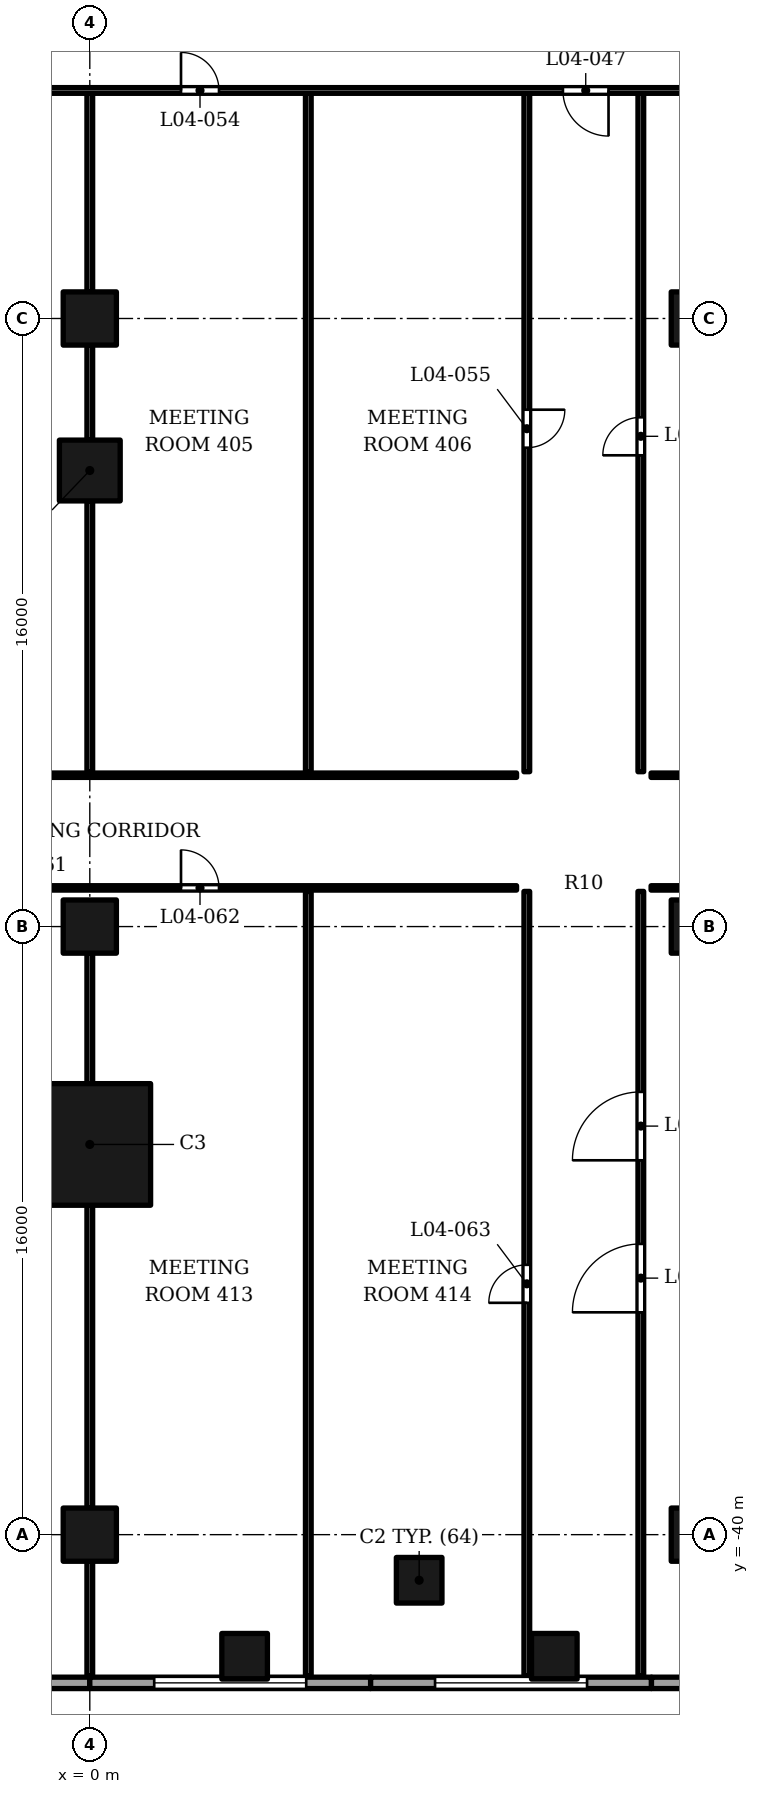
"""IFC4 building model, lengths in metres.
Left out: names, types, materials, properties, quantities, classifications, styles, units other than length and angle.
Written with IfcOpenShell. Run it as: python <this file> out.ifc"""

import sys

from ifc_helpers import new_model, si_unit, direction, frame, frame_2d, origin, origin_2d, place, context, subcontext, project, spatial, rectangle, extrude, element, fill, save


model = new_model("IFC4")
c1 = context("Model", 3, precision=1e-05, world=origin(), true_north=direction((0.0, 1.0)))
c2 = subcontext(c1, "Body", "Model", "MODEL_VIEW")
j1 = project(units=[si_unit("LENGTHUNIT", "METRE"), si_unit("PLANEANGLEUNIT", "RADIAN")], contexts=[c1])
p1 = place(None, origin())
s1 = spatial("IfcSite", under=j1, at=p1, CompositionType="ELEMENT")
p2 = place(p1, origin())
s2 = spatial("IfcBuilding", under=s1, at=p2, CompositionType="ELEMENT")
p3 = place(p2, frame((0.0, 0.0, 34.5)))
s3 = spatial("IfcBuildingStorey", under=s2, at=p3, CompositionType="ELEMENT", Elevation=34.5)
for number, where, z_axis, x_axis in (
    (1, (0.0, -40.0, 0.0), (0.0, 0.0, 1.0), (1.0, 0.0, 0.0)),
    (2, (0.0, -24.0, 0.0), (0.0, 0.0, 1.0), (1.0, 0.0, 0.0)),
    (3, (0.0, -8.0, 0.0), (0.0, 0.0, 1.0), (1.0, 0.0, 0.0)),
    (4, (16.0, -40.0, 0.0), (0.0, 0.0, 1.0), (1.0, 0.0, 0.0)),
    (5, (16.0, -24.0, 0.0), (0.0, 0.0, 1.0), (1.0, 0.0, 0.0)),
    (6, (16.0, -8.0, 0.0), (0.0, 0.0, 1.0), (1.0, 0.0, 0.0)),
):
    element("IfcColumn", number, at=place(p3, frame(where, z_axis=z_axis, x_axis=x_axis)), inside=s3, PredefinedType="COLUMN", context=c2, shape_type="SweptSolid", body=[
        extrude(rectangle(XDim=1.4, YDim=1.4, at=origin_2d()), origin(), (0.0, 0.0, 1.0), 5.5),
    ])
for number, where, z_axis, x_axis in (
    (7, (8.667, -41.2, 0.0), (0.0, 0.0, 1.0), (1.0, 0.0, 0.0)),
    (8, (12.223, -43.2, 0.0), (0.0, 0.0, 1.0), (1.0, 0.0, 0.0)),
    (9, (4.074, -43.2, 0.0), (0.0, 0.0, 1.0), (1.0, 0.0, 0.0)),
):
    element("IfcColumn", number, at=place(p3, frame(where, z_axis=z_axis, x_axis=x_axis)), inside=s3, PredefinedType="COLUMN", context=c2, shape_type="SweptSolid", body=[
        extrude(rectangle(XDim=1.2, YDim=1.2, at=origin_2d()), origin(), (0.0, 0.0, 1.0), 5.5),
    ])
p4 = place(p3, frame((0.0, -29.733, 0.0), z_axis=(0.0, 0.0, 1.0), x_axis=(0.0, 1.0, 0.0)))
e10 = element("IfcColumn", 10, at=p4, inside=s3, PredefinedType="COLUMN", context=c2, shape_type="SweptSolid", body=[
    extrude(rectangle(XDim=3.2, YDim=3.2, at=origin_2d()), origin(), (0.0, 0.0, 1.0), 5.5),
])
p5 = place(p3, frame((0.0, -12.0, 0.0), z_axis=(0.0, 0.0, 1.0), x_axis=(1.0, 0.0, 0.0)))
e11 = element("IfcColumn", 11, at=p5, inside=s3, PredefinedType="COLUMN", context=c2, shape_type="SweptSolid", body=[
    extrude(rectangle(XDim=1.6, YDim=1.6, at=origin_2d()), origin(), (0.0, 0.0, 1.0), 5.5),
])
p6 = place(p3, frame((-7.39, -43.9, 0.0), z_axis=(0.0, 0.0, 1.0), x_axis=(1.0, 0.0, 0.0)))
e12 = element("IfcWall", 12, at=p6, inside=s3, PredefinedType="SOLIDWALL", context=c2, shape_type="SweptSolid", body=[
    extrude(rectangle(XDim=7.39, YDim=0.3, at=frame_2d((3.695, 0.0))), origin(), (0.0, 0.0, 1.0), 4.1),
])
p7 = place(p6, frame((1.695, 0.0, 1.0)))
e13 = element("IfcOpeningElement", 13, at=p7, cuts=e12, PredefinedType="OPENING", context=c2, shape_type="SweptSolid", body=[
    extrude(rectangle(XDim=4.0, YDim=1.8, at=frame_2d((2.0, 0.9))), frame((0.0, 0.16, 0.0), z_axis=(0.0, -1.0, 0.0), x_axis=(1.0, 0.0, 0.0)), (0.0, 0.0, 1.0), 0.32),
])
p8 = place(p3, frame((0.0, -43.9, 0.0), z_axis=(0.0, 0.0, 1.0), x_axis=(1.0, 0.0, 0.0)))
e14 = element("IfcWall", 14, at=p8, inside=s3, PredefinedType="SOLIDWALL", context=c2, shape_type="SweptSolid", body=[
    extrude(rectangle(XDim=7.39, YDim=0.3, at=frame_2d((3.695, 0.0))), origin(), (0.0, 0.0, 1.0), 4.1),
])
p9 = place(p8, frame((1.695, 0.0, 1.0)))
e15 = element("IfcOpeningElement", 15, at=p9, cuts=e14, PredefinedType="OPENING", context=c2, shape_type="SweptSolid", body=[
    extrude(rectangle(XDim=4.0, YDim=1.8, at=frame_2d((2.0, 0.9))), frame((0.0, 0.16, 0.0), z_axis=(0.0, -1.0, 0.0), x_axis=(1.0, 0.0, 0.0)), (0.0, 0.0, 1.0), 0.32),
])
p10 = place(p3, frame((7.39, -43.9, 0.0), z_axis=(0.0, 0.0, 1.0), x_axis=(1.0, 0.0, 0.0)))
e16 = element("IfcWall", 16, at=p10, inside=s3, PredefinedType="SOLIDWALL", context=c2, shape_type="SweptSolid", body=[
    extrude(rectangle(XDim=7.39, YDim=0.3, at=frame_2d((3.695, 0.0))), origin(), (0.0, 0.0, 1.0), 4.1),
])
p11 = place(p10, frame((1.695, 0.0, 1.0)))
e17 = element("IfcOpeningElement", 17, at=p11, cuts=e16, PredefinedType="OPENING", context=c2, shape_type="SweptSolid", body=[
    extrude(rectangle(XDim=4.0, YDim=1.8, at=frame_2d((2.0, 0.9))), frame((0.0, 0.16, 0.0), z_axis=(0.0, -1.0, 0.0), x_axis=(1.0, 0.0, 0.0)), (0.0, 0.0, 1.0), 0.32),
])
p12 = place(p3, frame((14.78, -43.9, 0.0), z_axis=(0.0, 0.0, 1.0), x_axis=(1.0, 0.0, 0.0)))
e18 = element("IfcWall", 18, at=p12, inside=s3, PredefinedType="SOLIDWALL", context=c2, shape_type="SweptSolid", body=[
    extrude(rectangle(XDim=7.39, YDim=0.3, at=frame_2d((3.695, 0.0))), origin(), (0.0, 0.0, 1.0), 4.1),
])
p13 = place(p12, frame((1.695, 0.0, 1.0)))
e19 = element("IfcOpeningElement", 19, at=p13, cuts=e18, PredefinedType="OPENING", context=c2, shape_type="SweptSolid", body=[
    extrude(rectangle(XDim=4.0, YDim=1.8, at=frame_2d((2.0, 0.9))), frame((0.0, 0.16, 0.0), z_axis=(0.0, -1.0, 0.0), x_axis=(1.0, 0.0, 0.0)), (0.0, 0.0, 1.0), 0.32),
])
p14 = place(p3, frame((-7.4, -43.85, 5.5), z_axis=(0.0, 0.0, 1.0), x_axis=(1.0, 0.0, 0.0)))
e20 = element("IfcWall", 20, at=p14, inside=s3, PredefinedType="PARAPET", context=c2, shape_type="SweptSolid", body=[
    extrude(rectangle(XDim=14.8, YDim=0.3, at=frame_2d((7.4, 0.0))), origin(), (0.0, 0.0, 1.0), 1.1),
])
p15 = place(p3, frame((7.4, -43.85, 5.5), z_axis=(0.0, 0.0, 1.0), x_axis=(1.0, 0.0, 0.0)))
e21 = element("IfcWall", 21, at=p15, inside=s3, PredefinedType="PARAPET", context=c2, shape_type="SweptSolid", body=[
    extrude(rectangle(XDim=14.8, YDim=0.3, at=frame_2d((7.4, 0.0))), origin(), (0.0, 0.0, 1.0), 1.1),
])
p16 = place(p3, frame((0.0, -43.72, 0.0), z_axis=(0.0, 0.0, 1.0), x_axis=(0.0, 1.0, 0.0)))
e22 = element("IfcWall", 22, at=p16, inside=s3, PredefinedType="PARTITIONING", context=c2, shape_type="SweptSolid", body=[
    extrude(rectangle(XDim=3.02, YDim=0.15, at=frame_2d((1.51, 0.0))), origin(), (0.0, 0.0, 1.0), 4.15),
])
p17 = place(p3, frame((5.75, -43.72, 0.0), z_axis=(0.0, 0.0, 1.0), x_axis=(0.0, 1.0, 0.0)))
e23 = element("IfcWall", 23, at=p17, inside=s3, PredefinedType="PARTITIONING", context=c2, shape_type="SweptSolid", body=[
    extrude(rectangle(XDim=20.645, YDim=0.15, at=frame_2d((10.323, 0.0))), origin(), (0.0, 0.0, 1.0), 3.85),
])
p18 = place(p3, frame((11.5, -43.72, 0.0), z_axis=(0.0, 0.0, 1.0), x_axis=(0.0, 1.0, 0.0)))
e24 = element("IfcWall", 24, at=p18, inside=s3, PredefinedType="PARTITIONING", context=c2, shape_type="SweptSolid", body=[
    extrude(rectangle(XDim=20.645, YDim=0.15, at=frame_2d((10.323, 0.0))), origin(), (0.0, 0.0, 1.0), 3.85),
])
p19 = place(p18, frame((9.82, 0.0, 0.0)))
e25 = element("IfcOpeningElement", 25, at=p19, cuts=e24, PredefinedType="OPENING", context=c2, shape_type="SweptSolid", body=[
    extrude(rectangle(XDim=1.0, YDim=2.1, at=frame_2d((0.5, 1.05))), frame((0.0, 0.085, 0.0), z_axis=(0.0, -1.0, 0.0), x_axis=(1.0, 0.0, 0.0)), (0.0, 0.0, 1.0), 0.17),
])
p20 = place(p3, frame((14.5, -43.72, 0.0), z_axis=(0.0, 0.0, 1.0), x_axis=(0.0, 1.0, 0.0)))
e26 = element("IfcWall", 26, at=p20, inside=s3, PredefinedType="PARTITIONING", context=c2, shape_type="SweptSolid", body=[
    extrude(rectangle(XDim=20.645, YDim=0.15, at=frame_2d((10.323, 0.0))), origin(), (0.0, 0.0, 1.0), 3.85),
])
p21 = place(p20, frame((9.57, 0.0, 0.0)))
e27 = element("IfcOpeningElement", 27, at=p21, cuts=e26, PredefinedType="OPENING", context=c2, shape_type="SweptSolid", body=[
    extrude(rectangle(XDim=1.8, YDim=2.1, at=frame_2d((0.9, 1.05))), frame((0.0, 0.085, 0.0), z_axis=(0.0, -1.0, 0.0), x_axis=(1.0, 0.0, 0.0)), (0.0, 0.0, 1.0), 0.17),
])
p22 = place(p20, frame((13.57, 0.0, 0.0)))
e28 = element("IfcOpeningElement", 28, at=p22, cuts=e26, PredefinedType="OPENING", context=c2, shape_type="SweptSolid", body=[
    extrude(rectangle(XDim=1.8, YDim=2.1, at=frame_2d((0.9, 1.05))), frame((0.0, 0.085, 0.0), z_axis=(0.0, -1.0, 0.0), x_axis=(1.0, 0.0, 0.0)), (0.0, 0.0, 1.0), 0.17),
])
p23 = place(p3, frame((0.0, -39.3, 0.0), z_axis=(0.0, 0.0, 1.0), x_axis=(0.0, 1.0, 0.0)))
e29 = element("IfcWall", 29, at=p23, inside=s3, PredefinedType="PARTITIONING", context=c2, shape_type="SweptSolid", body=[
    extrude(rectangle(XDim=7.967, YDim=0.15, at=frame_2d((3.983, 0.0))), origin(), (0.0, 0.0, 1.0), 3.85),
])
p24 = place(p3, frame((0.0, -28.133, 0.0), z_axis=(0.0, 0.0, 1.0), x_axis=(0.0, 1.0, 0.0)))
e30 = element("IfcWall", 30, at=p24, inside=s3, PredefinedType="PARTITIONING", context=c2, shape_type="SweptSolid", body=[
    extrude(rectangle(XDim=3.433, YDim=0.15, at=frame_2d((1.717, 0.0))), origin(), (0.0, 0.0, 1.0), 3.85),
])
p25 = place(p3, frame((-11.23, -22.982, 0.0), z_axis=(0.0, 0.0, 1.0), x_axis=(1.0, 0.0, 0.0)))
e31 = element("IfcWall", 31, at=p25, inside=s3, PredefinedType="PARTITIONING", context=c2, shape_type="SweptSolid", body=[
    extrude(rectangle(XDim=22.46, YDim=0.115, at=frame_2d((11.23, 0.0))), origin(), (0.0, 0.0, 1.0), 3.85),
])
p26 = place(p25, frame((7.88, 0.0, 0.0)))
e32 = element("IfcOpeningElement", 32, at=p26, cuts=e31, PredefinedType="OPENING", context=c2, shape_type="SweptSolid", body=[
    extrude(rectangle(XDim=1.0, YDim=2.1, at=frame_2d((0.5, 1.05))), frame((0.0, 0.067, 0.0), z_axis=(0.0, -1.0, 0.0), x_axis=(1.0, 0.0, 0.0)), (0.0, 0.0, 1.0), 0.135),
])
p27 = place(p25, frame((13.63, 0.0, 0.0)))
e33 = element("IfcOpeningElement", 33, at=p27, cuts=e31, PredefinedType="OPENING", context=c2, shape_type="SweptSolid", body=[
    extrude(rectangle(XDim=1.0, YDim=2.1, at=frame_2d((0.5, 1.05))), frame((0.0, 0.067, 0.0), z_axis=(0.0, -1.0, 0.0), x_axis=(1.0, 0.0, 0.0)), (0.0, 0.0, 1.0), 0.135),
])
p28 = place(p3, frame((14.77, -22.982, 0.0), z_axis=(0.0, 0.0, 1.0), x_axis=(1.0, 0.0, 0.0)))
e34 = element("IfcWall", 34, at=p28, inside=s3, PredefinedType="PARTITIONING", context=c2, shape_type="SweptSolid", body=[
    extrude(rectangle(XDim=18.69, YDim=0.115, at=frame_2d((9.345, 0.0))), origin(), (0.0, 0.0, 1.0), 3.85),
])
p29 = place(p3, frame((-11.23, -20.018, 0.0), z_axis=(0.0, 0.0, 1.0), x_axis=(1.0, 0.0, 0.0)))
e35 = element("IfcWall", 35, at=p29, inside=s3, PredefinedType="PARTITIONING", context=c2, shape_type="SweptSolid", body=[
    extrude(rectangle(XDim=22.46, YDim=0.115, at=frame_2d((11.23, 0.0))), origin(), (0.0, 0.0, 1.0), 3.85),
])
p30 = place(p3, frame((14.77, -20.018, 0.0), z_axis=(0.0, 0.0, 1.0), x_axis=(1.0, 0.0, 0.0)))
e36 = element("IfcWall", 36, at=p30, inside=s3, PredefinedType="PARTITIONING", context=c2, shape_type="SweptSolid", body=[
    extrude(rectangle(XDim=18.905, YDim=0.115, at=frame_2d((9.453, 0.0))), origin(), (0.0, 0.0, 1.0), 3.85),
])
p31 = place(p30, frame((13.63, 0.0, 0.0)))
e37 = element("IfcOpeningElement", 37, at=p31, cuts=e36, PredefinedType="OPENING", context=c2, shape_type="SweptSolid", body=[
    extrude(rectangle(XDim=1.0, YDim=2.1, at=frame_2d((0.5, 1.05))), frame((0.0, 0.067, 0.0), z_axis=(0.0, -1.0, 0.0), x_axis=(1.0, 0.0, 0.0)), (0.0, 0.0, 1.0), 0.135),
])
p32 = place(p3, frame((0.0, -19.925, 0.0), z_axis=(0.0, 0.0, 1.0), x_axis=(0.0, 1.0, 0.0)))
e38 = element("IfcWall", 38, at=p32, inside=s3, PredefinedType="PARTITIONING", context=c2, shape_type="SweptSolid", body=[
    extrude(rectangle(XDim=7.125, YDim=0.15, at=frame_2d((3.562, 0.0))), origin(), (0.0, 0.0, 1.0), 3.85),
])
p33 = place(p3, frame((5.75, -19.925, 0.0), z_axis=(0.0, 0.0, 1.0), x_axis=(0.0, 1.0, 0.0)))
e39 = element("IfcWall", 39, at=p33, inside=s3, PredefinedType="PARTITIONING", context=c2, shape_type="SweptSolid", body=[
    extrude(rectangle(XDim=17.85, YDim=0.15, at=frame_2d((8.925, 0.0))), origin(), (0.0, 0.0, 1.0), 3.85),
])
p34 = place(p3, frame((11.5, -19.925, 0.0), z_axis=(0.0, 0.0, 1.0), x_axis=(0.0, 1.0, 0.0)))
e40 = element("IfcWall", 40, at=p34, inside=s3, PredefinedType="PARTITIONING", context=c2, shape_type="SweptSolid", body=[
    extrude(rectangle(XDim=17.85, YDim=0.15, at=frame_2d((8.925, 0.0))), origin(), (0.0, 0.0, 1.0), 3.85),
])
p35 = place(p34, frame((8.525, 0.0, 0.0)))
e41 = element("IfcOpeningElement", 41, at=p35, cuts=e40, PredefinedType="OPENING", context=c2, shape_type="SweptSolid", body=[
    extrude(rectangle(XDim=1.0, YDim=2.1, at=frame_2d((0.5, 1.05))), frame((0.0, 0.085, 0.0), z_axis=(0.0, -1.0, 0.0), x_axis=(1.0, 0.0, 0.0)), (0.0, 0.0, 1.0), 0.17),
])
p36 = place(p3, frame((14.5, -19.925, 0.0), z_axis=(0.0, 0.0, 1.0), x_axis=(0.0, 1.0, 0.0)))
e42 = element("IfcWall", 42, at=p36, inside=s3, PredefinedType="PARTITIONING", context=c2, shape_type="SweptSolid", body=[
    extrude(rectangle(XDim=17.85, YDim=0.15, at=frame_2d((8.925, 0.0))), origin(), (0.0, 0.0, 1.0), 3.85),
])
p37 = place(p36, frame((8.325, 0.0, 0.0)))
e43 = element("IfcOpeningElement", 43, at=p37, cuts=e42, PredefinedType="OPENING", context=c2, shape_type="SweptSolid", body=[
    extrude(rectangle(XDim=1.0, YDim=2.1, at=frame_2d((0.5, 1.05))), frame((0.0, 0.085, 0.0), z_axis=(0.0, -1.0, 0.0), x_axis=(1.0, 0.0, 0.0)), (0.0, 0.0, 1.0), 0.17),
])
p38 = place(p3, frame((0.0, -11.2, 0.0), z_axis=(0.0, 0.0, 1.0), x_axis=(0.0, 1.0, 0.0)))
e44 = element("IfcWall", 44, at=p38, inside=s3, PredefinedType="PARTITIONING", context=c2, shape_type="SweptSolid", body=[
    extrude(rectangle(XDim=2.5, YDim=0.15, at=frame_2d((1.25, 0.0))), origin(), (0.0, 0.0, 1.0), 3.85),
])
p39 = place(p3, frame((0.0, -7.3, 0.0), z_axis=(0.0, 0.0, 1.0), x_axis=(0.0, 1.0, 0.0)))
e45 = element("IfcWall", 45, at=p39, inside=s3, PredefinedType="PARTITIONING", context=c2, shape_type="SweptSolid", body=[
    extrude(rectangle(XDim=5.225, YDim=0.15, at=frame_2d((2.613, 0.0))), origin(), (0.0, 0.0, 1.0), 5.05),
])
p40 = place(p3, frame((-33.46, -2.0, 0.0), z_axis=(0.0, 0.0, 1.0), x_axis=(1.0, 0.0, 0.0)))
e46 = element("IfcWall", 46, at=p40, inside=s3, PredefinedType="PARTITIONING", context=c2, shape_type="SweptSolid", body=[
    extrude(rectangle(XDim=66.92, YDim=0.15, at=frame_2d((33.46, 0.0))), origin(), (0.0, 0.0, 1.0), 3.85),
])
p41 = place(p40, frame((19.91, 0.0, 0.0)))
e47 = element("IfcOpeningElement", 47, at=p41, cuts=e46, PredefinedType="OPENING", context=c2, shape_type="SweptSolid", body=[
    extrude(rectangle(XDim=1.2, YDim=2.1, at=frame_2d((0.6, 1.05))), frame((0.0, 0.085, 0.0), z_axis=(0.0, -1.0, 0.0), x_axis=(1.0, 0.0, 0.0)), (0.0, 0.0, 1.0), 0.17),
])
p42 = place(p40, frame((45.91, 0.0, 0.0)))
e48 = element("IfcOpeningElement", 48, at=p42, cuts=e46, PredefinedType="OPENING", context=c2, shape_type="SweptSolid", body=[
    extrude(rectangle(XDim=1.2, YDim=2.1, at=frame_2d((0.6, 1.05))), frame((0.0, 0.085, 0.0), z_axis=(0.0, -1.0, 0.0), x_axis=(1.0, 0.0, 0.0)), (0.0, 0.0, 1.0), 0.17),
])
p43 = place(p40, frame((30.11, 0.0, 0.0)))
e49 = element("IfcOpeningElement", 49, at=p43, cuts=e46, PredefinedType="OPENING", context=c2, shape_type="SweptSolid", body=[
    extrude(rectangle(XDim=1.0, YDim=2.1, at=frame_2d((0.5, 1.05))), frame((0.0, 0.085, 0.0), z_axis=(0.0, -1.0, 0.0), x_axis=(1.0, 0.0, 0.0)), (0.0, 0.0, 1.0), 0.17),
])
p44 = place(p40, frame((35.86, 0.0, 0.0)))
e50 = element("IfcOpeningElement", 50, at=p44, cuts=e46, PredefinedType="OPENING", context=c2, shape_type="SweptSolid", body=[
    extrude(rectangle(XDim=1.0, YDim=2.1, at=frame_2d((0.5, 1.05))), frame((0.0, 0.085, 0.0), z_axis=(0.0, -1.0, 0.0), x_axis=(1.0, 0.0, 0.0)), (0.0, 0.0, 1.0), 0.17),
])
p45 = place(p9, origin())
e51 = element("IfcWindow", 51, at=p45, inside=s3, PartitioningType="SINGLE_PANEL", PredefinedType="WINDOW", context=c2, shape_type="SweptSolid", body=[
    extrude(rectangle(XDim=4.0, YDim=1.8, at=frame_2d((2.0, 0.9))), frame((0.0, 0.03, 0.0), z_axis=(0.0, -1.0, 0.0), x_axis=(1.0, 0.0, 0.0)), (0.0, 0.0, 1.0), 0.06),
])
fill(e15, e51)
p46 = place(p11, origin())
e52 = element("IfcWindow", 52, at=p46, inside=s3, PartitioningType="SINGLE_PANEL", PredefinedType="WINDOW", context=c2, shape_type="SweptSolid", body=[
    extrude(rectangle(XDim=4.0, YDim=1.8, at=frame_2d((2.0, 0.9))), frame((0.0, 0.03, 0.0), z_axis=(0.0, -1.0, 0.0), x_axis=(1.0, 0.0, 0.0)), (0.0, 0.0, 1.0), 0.06),
])
fill(e17, e52)
p47 = place(p42, origin())
e53 = element("IfcDoor", 53, at=p47, inside=s3, OperationType="SINGLE_SWING_RIGHT", PredefinedType="DOOR", context=c2, shape_type="SweptSolid", body=[
    extrude(rectangle(XDim=1.2, YDim=2.1, at=frame_2d((0.6, 1.05))), frame((0.0, 0.025, 0.0), z_axis=(0.0, -1.0, 0.0), x_axis=(1.0, 0.0, 0.0)), (0.0, 0.0, 1.0), 0.05),
])
fill(e48, e53)
p48 = place(p21, origin())
e54 = element("IfcDoor", 54, at=p48, inside=s3, OperationType="DOUBLE_DOOR_SINGLE_SWING", PredefinedType="DOOR", context=c2, shape_type="SweptSolid", body=[
    extrude(rectangle(XDim=1.8, YDim=2.1, at=frame_2d((0.9, 1.05))), frame((0.0, 0.025, 0.0), z_axis=(0.0, -1.0, 0.0), x_axis=(1.0, 0.0, 0.0)), (0.0, 0.0, 1.0), 0.05),
])
fill(e27, e54)
p49 = place(p22, origin())
e55 = element("IfcDoor", 55, at=p49, inside=s3, OperationType="DOUBLE_DOOR_SINGLE_SWING", PredefinedType="DOOR", context=c2, shape_type="SweptSolid", body=[
    extrude(rectangle(XDim=1.8, YDim=2.1, at=frame_2d((0.9, 1.05))), frame((0.0, 0.025, 0.0), z_axis=(0.0, -1.0, 0.0), x_axis=(1.0, 0.0, 0.0)), (0.0, 0.0, 1.0), 0.05),
])
fill(e28, e55)
p50 = place(p44, origin())
e56 = element("IfcDoor", 56, at=p50, inside=s3, OperationType="SINGLE_SWING_LEFT", PredefinedType="DOOR", context=c2, shape_type="SweptSolid", body=[
    extrude(rectangle(XDim=1.0, YDim=2.1, at=frame_2d((0.5, 1.05))), frame((0.0, 0.025, 0.0), z_axis=(0.0, -1.0, 0.0), x_axis=(1.0, 0.0, 0.0)), (0.0, 0.0, 1.0), 0.05),
])
fill(e50, e56)
p51 = place(p35, origin())
e57 = element("IfcDoor", 57, at=p51, inside=s3, OperationType="SINGLE_SWING_RIGHT", PredefinedType="DOOR", context=c2, shape_type="SweptSolid", body=[
    extrude(rectangle(XDim=1.0, YDim=2.1, at=frame_2d((0.5, 1.05))), frame((0.0, 0.025, 0.0), z_axis=(0.0, -1.0, 0.0), x_axis=(1.0, 0.0, 0.0)), (0.0, 0.0, 1.0), 0.05),
])
fill(e41, e57)
p52 = place(p37, origin())
e58 = element("IfcDoor", 58, at=p52, inside=s3, OperationType="SINGLE_SWING_LEFT", PredefinedType="DOOR", context=c2, shape_type="SweptSolid", body=[
    extrude(rectangle(XDim=1.0, YDim=2.1, at=frame_2d((0.5, 1.05))), frame((0.0, 0.025, 0.0), z_axis=(0.0, -1.0, 0.0), x_axis=(1.0, 0.0, 0.0)), (0.0, 0.0, 1.0), 0.05),
])
fill(e43, e58)
p53 = place(p27, origin())
e59 = element("IfcDoor", 59, at=p53, inside=s3, OperationType="SINGLE_SWING_LEFT", PredefinedType="DOOR", context=c2, shape_type="SweptSolid", body=[
    extrude(rectangle(XDim=1.0, YDim=2.1, at=frame_2d((0.5, 1.05))), frame((0.0, 0.025, 0.0), z_axis=(0.0, -1.0, 0.0), x_axis=(1.0, 0.0, 0.0)), (0.0, 0.0, 1.0), 0.05),
])
fill(e33, e59)
p54 = place(p19, origin())
e60 = element("IfcDoor", 60, at=p54, inside=s3, OperationType="SINGLE_SWING_LEFT", PredefinedType="DOOR", context=c2, shape_type="SweptSolid", body=[
    extrude(rectangle(XDim=1.0, YDim=2.1, at=frame_2d((0.5, 1.05))), frame((0.0, 0.025, 0.0), z_axis=(0.0, -1.0, 0.0), x_axis=(1.0, 0.0, 0.0)), (0.0, 0.0, 1.0), 0.05),
])
fill(e25, e60)
save(model, sys.argv[1])
